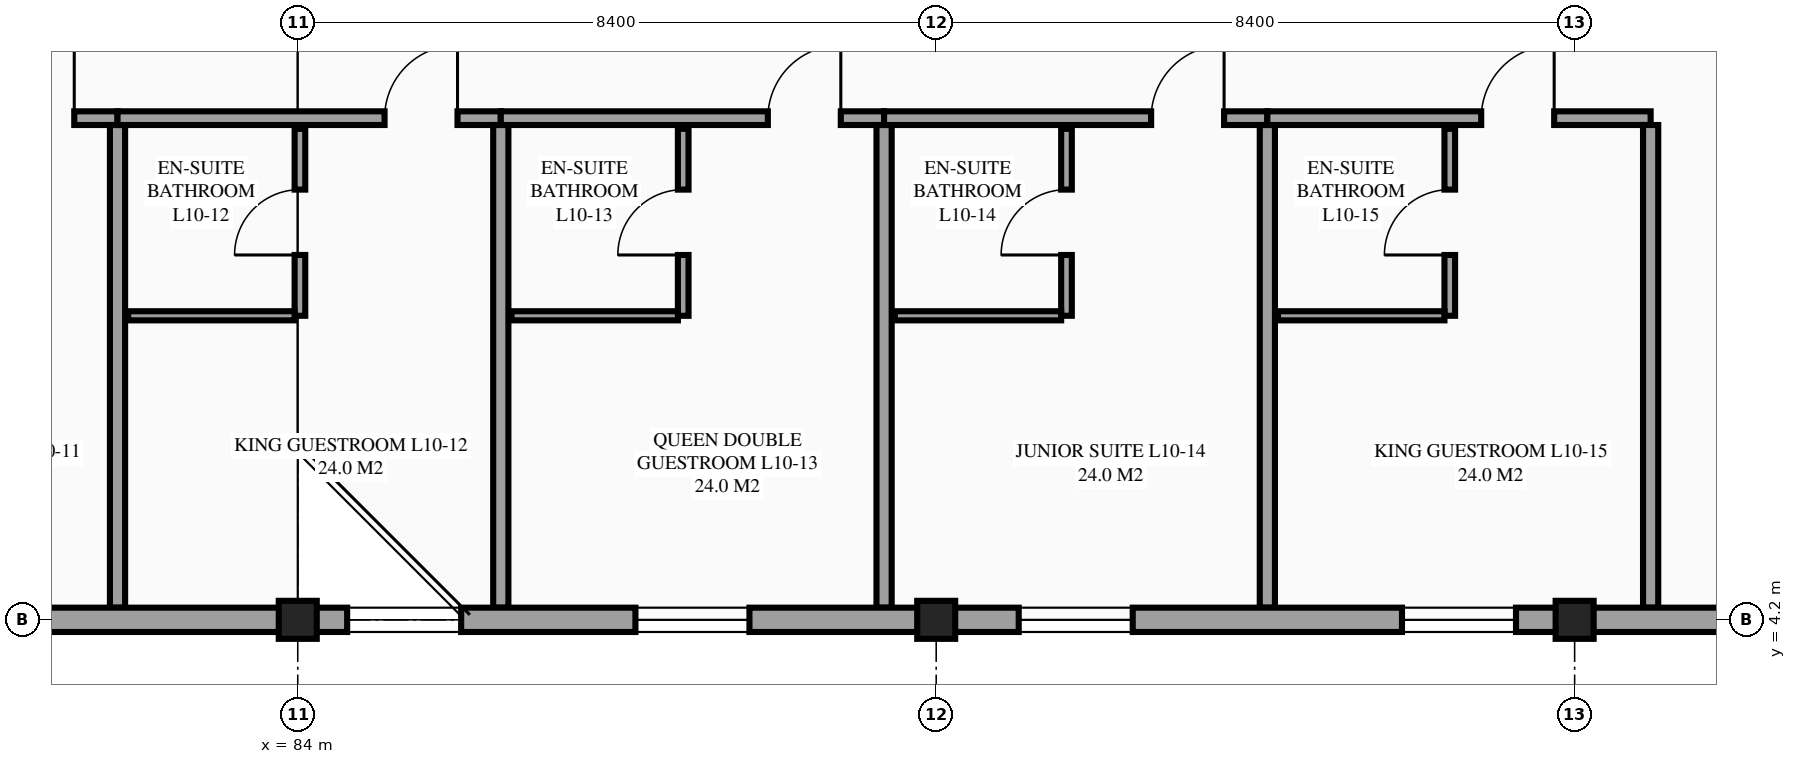
"""IFC4 building model, lengths in metres.
Left out: names, types, materials, properties, quantities, classifications, styles, units other than length and angle.
Written with IfcOpenShell. Run it as: python <this file> out.ifc"""

import sys

from ifc_helpers import new_model, si_unit, direction, frame, frame_2d, origin, origin_2d, place, context, subcontext, project, spatial, rectangle, extrude, element, fill, save


model = new_model("IFC4")
c1 = context("Model", 3, precision=1e-05, world=origin(), true_north=direction((0.0, 1.0)))
c2 = subcontext(c1, "Body", "Model", "MODEL_VIEW")
j1 = project(units=[si_unit("LENGTHUNIT", "METRE"), si_unit("PLANEANGLEUNIT", "RADIAN")], contexts=[c1])
p1 = place(None, origin())
s1 = spatial("IfcSite", under=j1, at=p1, CompositionType="ELEMENT")
p2 = place(p1, origin())
s2 = spatial("IfcBuilding", under=s1, at=p2, CompositionType="ELEMENT")
p3 = place(p2, frame((0.0, 0.0, 39.9)))
s3 = spatial("IfcBuildingStorey", under=s2, at=p3, CompositionType="ELEMENT", Elevation=39.9)
for number, where, z_axis, x_axis in (
    (1, (84.0, 4.2, 0.0), (0.0, 0.0, 1.0), (1.0, 0.0, 0.0)),
    (2, (92.4, 4.2, 0.0), (0.0, 0.0, 1.0), (1.0, 0.0, 0.0)),
    (3, (100.8, 4.2, 0.0), (0.0, 0.0, 1.0), (1.0, 0.0, 0.0)),
):
    element("IfcColumn", number, at=place(p3, frame(where, z_axis=z_axis, x_axis=x_axis)), inside=s3, PredefinedType="COLUMN", context=c2, shape_type="SweptSolid", body=[
        extrude(rectangle(XDim=0.5, YDim=0.5, at=origin_2d()), origin(), (0.0, 0.0, 1.0), 3.6),
    ])
p4 = place(p3, frame((76.586, 10.8, 0.0), z_axis=(0.0, 0.0, 1.0), x_axis=(1.0, 0.0, 0.0)))
e4 = element("IfcWall", 4, at=p4, inside=s3, PredefinedType="PARTITIONING", context=c2, shape_type="SweptSolid", body=[
    extrude(rectangle(XDim=5.043, YDim=0.18, at=frame_2d((2.521, 0.0))), origin(), (0.0, 0.0, 1.0), 3.375),
])
p5 = place(p4, frame((3.514, 0.0, 0.0)))
e5 = element("IfcOpeningElement", 5, at=p5, cuts=e4, PredefinedType="OPENING", context=c2, shape_type="SweptSolid", body=[
    extrude(rectangle(XDim=0.96, YDim=2.15, at=frame_2d((0.48, 1.075))), frame((0.0, 0.1, 0.0), z_axis=(0.0, -1.0, 0.0), x_axis=(1.0, 0.0, 0.0)), (0.0, 0.0, 1.0), 0.2),
])
p6 = place(p3, frame((81.629, 4.36, 0.0), z_axis=(0.0, 0.0, 1.0), x_axis=(0.0, 1.0, 0.0)))
e6 = element("IfcWall", 6, at=p6, inside=s3, PredefinedType="PARTITIONING", context=c2, shape_type="SweptSolid", body=[
    extrude(rectangle(XDim=6.35, YDim=0.2, at=frame_2d((3.175, 0.0))), origin(), (0.0, 0.0, 1.0), 3.375),
])
p7 = place(p3, frame((81.629, 10.8, 0.0), z_axis=(0.0, 0.0, 1.0), x_axis=(1.0, 0.0, 0.0)))
e7 = element("IfcWall", 7, at=p7, inside=s3, PredefinedType="PARTITIONING", context=c2, shape_type="SweptSolid", body=[
    extrude(rectangle(XDim=5.043, YDim=0.18, at=frame_2d((2.521, 0.0))), origin(), (0.0, 0.0, 1.0), 3.375),
])
p8 = place(p7, frame((3.513, 0.0, 0.0)))
e8 = element("IfcOpeningElement", 8, at=p8, cuts=e7, PredefinedType="OPENING", context=c2, shape_type="SweptSolid", body=[
    extrude(rectangle(XDim=0.96, YDim=2.15, at=frame_2d((0.48, 1.075))), frame((0.0, 0.1, 0.0), z_axis=(0.0, -1.0, 0.0), x_axis=(1.0, 0.0, 0.0)), (0.0, 0.0, 1.0), 0.2),
])
p9 = place(p3, frame((86.671, 4.36, 0.0), z_axis=(0.0, 0.0, 1.0), x_axis=(0.0, 1.0, 0.0)))
e9 = element("IfcWall", 9, at=p9, inside=s3, PredefinedType="PARTITIONING", context=c2, shape_type="SweptSolid", body=[
    extrude(rectangle(XDim=6.35, YDim=0.2, at=frame_2d((3.175, 0.0))), origin(), (0.0, 0.0, 1.0), 3.375),
])
p10 = place(p3, frame((84.029, 8.2, 0.0), z_axis=(0.0, 0.0, 1.0), x_axis=(0.0, 1.0, 0.0)))
e10 = element("IfcWall", 10, at=p10, inside=s3, PredefinedType="PARTITIONING", context=c2, shape_type="SweptSolid", body=[
    extrude(rectangle(XDim=2.46, YDim=0.14, at=frame_2d((1.23, 0.0))), origin(), (0.0, 0.0, 1.0), 2.48),
])
p11 = place(p10, frame((0.8, 0.0, 0.0)))
e11 = element("IfcOpeningElement", 11, at=p11, cuts=e10, PredefinedType="OPENING", context=c2, shape_type="SweptSolid", body=[
    extrude(rectangle(XDim=0.86, YDim=2.1, at=frame_2d((0.43, 1.05))), frame((0.0, 0.08, 0.0), z_axis=(0.0, -1.0, 0.0), x_axis=(1.0, 0.0, 0.0)), (0.0, 0.0, 1.0), 0.16),
])
p12 = place(p3, frame((81.769, 8.2, 0.0), z_axis=(0.0, 0.0, 1.0), x_axis=(1.0, 0.0, 0.0)))
e12 = element("IfcWall", 12, at=p12, inside=s3, PredefinedType="PARTITIONING", context=c2, shape_type="SweptSolid", body=[
    extrude(rectangle(XDim=2.19, YDim=0.12, at=frame_2d((1.095, 0.0))), origin(), (0.0, 0.0, 1.0), 3.375),
])
p13 = place(p3, frame((86.671, 10.8, 0.0), z_axis=(0.0, 0.0, 1.0), x_axis=(1.0, 0.0, 0.0)))
e13 = element("IfcWall", 13, at=p13, inside=s3, PredefinedType="PARTITIONING", context=c2, shape_type="SweptSolid", body=[
    extrude(rectangle(XDim=5.043, YDim=0.18, at=frame_2d((2.521, 0.0))), origin(), (0.0, 0.0, 1.0), 3.375),
])
p14 = place(p13, frame((3.514, 0.0, 0.0)))
e14 = element("IfcOpeningElement", 14, at=p14, cuts=e13, PredefinedType="OPENING", context=c2, shape_type="SweptSolid", body=[
    extrude(rectangle(XDim=0.96, YDim=2.15, at=frame_2d((0.48, 1.075))), frame((0.0, 0.1, 0.0), z_axis=(0.0, -1.0, 0.0), x_axis=(1.0, 0.0, 0.0)), (0.0, 0.0, 1.0), 0.2),
])
p15 = place(p3, frame((91.714, 4.36, 0.0), z_axis=(0.0, 0.0, 1.0), x_axis=(0.0, 1.0, 0.0)))
e15 = element("IfcWall", 15, at=p15, inside=s3, PredefinedType="PARTITIONING", context=c2, shape_type="SweptSolid", body=[
    extrude(rectangle(XDim=6.35, YDim=0.2, at=frame_2d((3.175, 0.0))), origin(), (0.0, 0.0, 1.0), 3.375),
])
p16 = place(p3, frame((89.071, 8.2, 0.0), z_axis=(0.0, 0.0, 1.0), x_axis=(0.0, 1.0, 0.0)))
e16 = element("IfcWall", 16, at=p16, inside=s3, PredefinedType="PARTITIONING", context=c2, shape_type="SweptSolid", body=[
    extrude(rectangle(XDim=2.46, YDim=0.14, at=frame_2d((1.23, 0.0))), origin(), (0.0, 0.0, 1.0), 3.375),
])
p17 = place(p16, frame((0.8, 0.0, 0.0)))
e17 = element("IfcOpeningElement", 17, at=p17, cuts=e16, PredefinedType="OPENING", context=c2, shape_type="SweptSolid", body=[
    extrude(rectangle(XDim=0.86, YDim=2.1, at=frame_2d((0.43, 1.05))), frame((0.0, 0.08, 0.0), z_axis=(0.0, -1.0, 0.0), x_axis=(1.0, 0.0, 0.0)), (0.0, 0.0, 1.0), 0.16),
])
p18 = place(p3, frame((86.811, 8.2, 0.0), z_axis=(0.0, 0.0, 1.0), x_axis=(1.0, 0.0, 0.0)))
e18 = element("IfcWall", 18, at=p18, inside=s3, PredefinedType="PARTITIONING", context=c2, shape_type="SweptSolid", body=[
    extrude(rectangle(XDim=2.19, YDim=0.12, at=frame_2d((1.095, 0.0))), origin(), (0.0, 0.0, 1.0), 3.375),
])
p19 = place(p3, frame((91.714, 10.8, 0.0), z_axis=(0.0, 0.0, 1.0), x_axis=(1.0, 0.0, 0.0)))
e19 = element("IfcWall", 19, at=p19, inside=s3, PredefinedType="PARTITIONING", context=c2, shape_type="SweptSolid", body=[
    extrude(rectangle(XDim=5.043, YDim=0.18, at=frame_2d((2.521, 0.0))), origin(), (0.0, 0.0, 1.0), 3.375),
])
p20 = place(p19, frame((3.513, 0.0, 0.0)))
e20 = element("IfcOpeningElement", 20, at=p20, cuts=e19, PredefinedType="OPENING", context=c2, shape_type="SweptSolid", body=[
    extrude(rectangle(XDim=0.96, YDim=2.15, at=frame_2d((0.48, 1.075))), frame((0.0, 0.1, 0.0), z_axis=(0.0, -1.0, 0.0), x_axis=(1.0, 0.0, 0.0)), (0.0, 0.0, 1.0), 0.2),
])
p21 = place(p3, frame((96.757, 4.36, 0.0), z_axis=(0.0, 0.0, 1.0), x_axis=(0.0, 1.0, 0.0)))
e21 = element("IfcWall", 21, at=p21, inside=s3, PredefinedType="PARTITIONING", context=c2, shape_type="SweptSolid", body=[
    extrude(rectangle(XDim=6.35, YDim=0.2, at=frame_2d((3.175, 0.0))), origin(), (0.0, 0.0, 1.0), 3.375),
])
p22 = place(p3, frame((94.114, 8.2, 0.0), z_axis=(0.0, 0.0, 1.0), x_axis=(0.0, 1.0, 0.0)))
e22 = element("IfcWall", 22, at=p22, inside=s3, PredefinedType="PARTITIONING", context=c2, shape_type="SweptSolid", body=[
    extrude(rectangle(XDim=2.46, YDim=0.14, at=frame_2d((1.23, 0.0))), origin(), (0.0, 0.0, 1.0), 3.375),
])
p23 = place(p22, frame((0.8, 0.0, 0.0)))
e23 = element("IfcOpeningElement", 23, at=p23, cuts=e22, PredefinedType="OPENING", context=c2, shape_type="SweptSolid", body=[
    extrude(rectangle(XDim=0.86, YDim=2.1, at=frame_2d((0.43, 1.05))), frame((0.0, 0.08, 0.0), z_axis=(0.0, -1.0, 0.0), x_axis=(1.0, 0.0, 0.0)), (0.0, 0.0, 1.0), 0.16),
])
p24 = place(p3, frame((91.854, 8.2, 0.0), z_axis=(0.0, 0.0, 1.0), x_axis=(1.0, 0.0, 0.0)))
e24 = element("IfcWall", 24, at=p24, inside=s3, PredefinedType="PARTITIONING", context=c2, shape_type="SweptSolid", body=[
    extrude(rectangle(XDim=2.19, YDim=0.12, at=frame_2d((1.095, 0.0))), origin(), (0.0, 0.0, 1.0), 3.375),
])
p25 = place(p3, frame((96.757, 10.8, 0.0), z_axis=(0.0, 0.0, 1.0), x_axis=(1.0, 0.0, 0.0)))
e25 = element("IfcWall", 25, at=p25, inside=s3, PredefinedType="PARTITIONING", context=c2, shape_type="SweptSolid", body=[
    extrude(rectangle(XDim=5.043, YDim=0.18, at=frame_2d((2.521, 0.0))), origin(), (0.0, 0.0, 1.0), 3.375),
])
p26 = place(p25, frame((2.814, 0.0, 0.0)))
e26 = element("IfcOpeningElement", 26, at=p26, cuts=e25, PredefinedType="OPENING", context=c2, shape_type="SweptSolid", body=[
    extrude(rectangle(XDim=0.96, YDim=2.15, at=frame_2d((0.48, 1.075))), frame((0.0, 0.1, 0.0), z_axis=(0.0, -1.0, 0.0), x_axis=(1.0, 0.0, 0.0)), (0.0, 0.0, 1.0), 0.2),
])
p27 = place(p3, frame((101.8, 4.36, 0.0), z_axis=(0.0, 0.0, 1.0), x_axis=(0.0, 1.0, 0.0)))
e27 = element("IfcWall", 27, at=p27, inside=s3, PredefinedType="PARTITIONING", context=c2, shape_type="SweptSolid", body=[
    extrude(rectangle(XDim=6.35, YDim=0.2, at=frame_2d((3.175, 0.0))), origin(), (0.0, 0.0, 1.0), 3.375),
])
p28 = place(p3, frame((99.157, 8.2, 0.0), z_axis=(0.0, 0.0, 1.0), x_axis=(0.0, 1.0, 0.0)))
e28 = element("IfcWall", 28, at=p28, inside=s3, PredefinedType="PARTITIONING", context=c2, shape_type="SweptSolid", body=[
    extrude(rectangle(XDim=2.46, YDim=0.14, at=frame_2d((1.23, 0.0))), origin(), (0.0, 0.0, 1.0), 3.375),
])
p29 = place(p28, frame((0.8, 0.0, 0.0)))
e29 = element("IfcOpeningElement", 29, at=p29, cuts=e28, PredefinedType="OPENING", context=c2, shape_type="SweptSolid", body=[
    extrude(rectangle(XDim=0.86, YDim=2.1, at=frame_2d((0.43, 1.05))), frame((0.0, 0.08, 0.0), z_axis=(0.0, -1.0, 0.0), x_axis=(1.0, 0.0, 0.0)), (0.0, 0.0, 1.0), 0.16),
])
p30 = place(p3, frame((96.897, 8.2, 0.0), z_axis=(0.0, 0.0, 1.0), x_axis=(1.0, 0.0, 0.0)))
e30 = element("IfcWall", 30, at=p30, inside=s3, PredefinedType="PARTITIONING", context=c2, shape_type="SweptSolid", body=[
    extrude(rectangle(XDim=2.19, YDim=0.12, at=frame_2d((1.095, 0.0))), origin(), (0.0, 0.0, 1.0), 3.375),
])
p31 = place(p3, frame((75.6, 4.2, 0.0), z_axis=(0.0, 0.0, 1.0), x_axis=(1.0, 0.0, 0.0)))
e31 = element("IfcWall", 31, at=p31, inside=s3, PredefinedType="STANDARD", context=c2, shape_type="SweptSolid", body=[
    extrude(rectangle(XDim=8.4, YDim=0.32, at=frame_2d((4.2, 0.0))), origin(), (0.0, 0.0, 1.0), 2.48),
])
p32 = place(p31, frame((2.907, 0.0, 0.85)))
e32 = element("IfcOpeningElement", 32, at=p32, cuts=e31, PredefinedType="OPENING", context=c2, shape_type="SweptSolid", body=[
    extrude(rectangle(XDim=1.2, YDim=1.5, at=frame_2d((0.6, 0.75))), frame((0.0, 0.17, 0.0), z_axis=(0.0, -1.0, 0.0), x_axis=(1.0, 0.0, 0.0)), (0.0, 0.0, 1.0), 0.34),
])
p33 = place(p3, frame((84.0, 4.2, 0.0), z_axis=(0.0, 0.0, 1.0), x_axis=(1.0, 0.0, 0.0)))
e33 = element("IfcWall", 33, at=p33, inside=s3, PredefinedType="STANDARD", context=c2, shape_type="SweptSolid", body=[
    extrude(rectangle(XDim=8.4, YDim=0.32, at=frame_2d((4.2, 0.0))), origin(), (0.0, 0.0, 1.0), 2.58),
])
p34 = place(p33, frame((0.65, 0.0, 0.85)))
e34 = element("IfcOpeningElement", 34, at=p34, cuts=e33, PredefinedType="OPENING", context=c2, shape_type="SweptSolid", body=[
    extrude(rectangle(XDim=1.5, YDim=1.5, at=frame_2d((0.75, 0.75))), frame((0.0, 0.17, 0.0), z_axis=(0.0, -1.0, 0.0), x_axis=(1.0, 0.0, 0.0)), (0.0, 0.0, 1.0), 0.34),
])
p35 = place(p33, frame((4.443, 0.0, 0.85)))
e35 = element("IfcOpeningElement", 35, at=p35, cuts=e33, PredefinedType="OPENING", context=c2, shape_type="SweptSolid", body=[
    extrude(rectangle(XDim=1.5, YDim=1.5, at=frame_2d((0.75, 0.75))), frame((0.0, 0.17, 0.0), z_axis=(0.0, -1.0, 0.0), x_axis=(1.0, 0.0, 0.0)), (0.0, 0.0, 1.0), 0.34),
])
p36 = place(p3, frame((92.4, 4.2, 0.0), z_axis=(0.0, 0.0, 1.0), x_axis=(1.0, 0.0, 0.0)))
e36 = element("IfcWall", 36, at=p36, inside=s3, PredefinedType="STANDARD", context=c2, shape_type="SweptSolid", body=[
    extrude(rectangle(XDim=8.4, YDim=0.32, at=frame_2d((4.2, 0.0))), origin(), (0.0, 0.0, 1.0), 3.126),
])
p37 = place(p36, frame((1.086, 0.0, 0.85)))
e37 = element("IfcOpeningElement", 37, at=p37, cuts=e36, PredefinedType="OPENING", context=c2, shape_type="SweptSolid", body=[
    extrude(rectangle(XDim=1.5, YDim=1.5, at=frame_2d((0.75, 0.75))), frame((0.0, 0.17, 0.0), z_axis=(0.0, -1.0, 0.0), x_axis=(1.0, 0.0, 0.0)), (0.0, 0.0, 1.0), 0.34),
])
p38 = place(p36, frame((6.128, 0.0, 0.85)))
e38 = element("IfcOpeningElement", 38, at=p38, cuts=e36, PredefinedType="OPENING", context=c2, shape_type="SweptSolid", body=[
    extrude(rectangle(XDim=1.5, YDim=1.5, at=frame_2d((0.75, 0.75))), frame((0.0, 0.17, 0.0), z_axis=(0.0, -1.0, 0.0), x_axis=(1.0, 0.0, 0.0)), (0.0, 0.0, 1.0), 0.34),
])
p39 = place(p3, frame((100.8, 4.2, 0.0), z_axis=(0.0, 0.0, 1.0), x_axis=(1.0, 0.0, 0.0)))
e39 = element("IfcWall", 39, at=p39, inside=s3, PredefinedType="STANDARD", context=c2, shape_type="SweptSolid", body=[
    extrude(rectangle(XDim=16.8, YDim=0.32, at=frame_2d((8.4, 0.0))), origin(), (0.0, 0.0, 1.0), 2.63),
])
p40 = place(p39, frame((9.45, 0.0, 0.85)))
e40 = element("IfcOpeningElement", 40, at=p40, cuts=e39, PredefinedType="OPENING", context=c2, shape_type="SweptSolid", body=[
    extrude(rectangle(XDim=1.5, YDim=1.5, at=frame_2d((0.75, 0.75))), frame((0.0, 0.17, 0.0), z_axis=(0.0, -1.0, 0.0), x_axis=(1.0, 0.0, 0.0)), (0.0, 0.0, 1.0), 0.34),
])
p41 = place(p39, frame((13.85, 0.0, 0.85)))
e41 = element("IfcOpeningElement", 41, at=p41, cuts=e39, PredefinedType="OPENING", context=c2, shape_type="SweptSolid", body=[
    extrude(rectangle(XDim=1.5, YDim=1.5, at=frame_2d((0.75, 0.75))), frame((0.0, 0.17, 0.0), z_axis=(0.0, -1.0, 0.0), x_axis=(1.0, 0.0, 0.0)), (0.0, 0.0, 1.0), 0.34),
])
p42 = place(p34, origin())
e42 = element("IfcWindow", 42, at=p42, inside=s3, PartitioningType="SINGLE_PANEL", PredefinedType="WINDOW", context=c2, shape_type="SweptSolid", body=[
    extrude(rectangle(XDim=1.5, YDim=1.5, at=frame_2d((0.75, 0.75))), frame((0.0, 0.03, 0.0), z_axis=(0.0, -1.0, 0.0), x_axis=(1.0, 0.0, 0.0)), (0.0, 0.0, 1.0), 0.06),
])
fill(e34, e42)
p43 = place(p35, origin())
e43 = element("IfcWindow", 43, at=p43, inside=s3, PartitioningType="SINGLE_PANEL", PredefinedType="WINDOW", context=c2, shape_type="SweptSolid", body=[
    extrude(rectangle(XDim=1.5, YDim=1.5, at=frame_2d((0.75, 0.75))), frame((0.0, 0.03, 0.0), z_axis=(0.0, -1.0, 0.0), x_axis=(1.0, 0.0, 0.0)), (0.0, 0.0, 1.0), 0.06),
])
fill(e35, e43)
p44 = place(p37, origin())
e44 = element("IfcWindow", 44, at=p44, inside=s3, PartitioningType="SINGLE_PANEL", PredefinedType="WINDOW", context=c2, shape_type="SweptSolid", body=[
    extrude(rectangle(XDim=1.5, YDim=1.5, at=frame_2d((0.75, 0.75))), frame((0.0, 0.03, 0.0), z_axis=(0.0, -1.0, 0.0), x_axis=(1.0, 0.0, 0.0)), (0.0, 0.0, 1.0), 0.06),
])
fill(e37, e44)
p45 = place(p38, origin())
e45 = element("IfcWindow", 45, at=p45, inside=s3, PartitioningType="SINGLE_PANEL", PredefinedType="WINDOW", context=c2, shape_type="SweptSolid", body=[
    extrude(rectangle(XDim=1.5, YDim=1.5, at=frame_2d((0.75, 0.75))), frame((0.0, 0.03, 0.0), z_axis=(0.0, -1.0, 0.0), x_axis=(1.0, 0.0, 0.0)), (0.0, 0.0, 1.0), 0.06),
])
fill(e38, e45)
p46 = place(p5, origin())
e46 = element("IfcDoor", 46, at=p46, inside=s3, OperationType="SINGLE_SWING_RIGHT", PredefinedType="DOOR", context=c2, shape_type="SweptSolid", body=[
    extrude(rectangle(XDim=0.96, YDim=2.15, at=frame_2d((0.48, 1.075))), frame((0.0, 0.025, 0.0), z_axis=(0.0, -1.0, 0.0), x_axis=(1.0, 0.0, 0.0)), (0.0, 0.0, 1.0), 0.05),
])
fill(e5, e46)
p47 = place(p8, origin())
e47 = element("IfcDoor", 47, at=p47, inside=s3, OperationType="SINGLE_SWING_RIGHT", PredefinedType="DOOR", context=c2, shape_type="SweptSolid", body=[
    extrude(rectangle(XDim=0.96, YDim=2.15, at=frame_2d((0.48, 1.075))), frame((0.0, 0.025, 0.0), z_axis=(0.0, -1.0, 0.0), x_axis=(1.0, 0.0, 0.0)), (0.0, 0.0, 1.0), 0.05),
])
fill(e8, e47)
p48 = place(p11, origin())
e48 = element("IfcDoor", 48, at=p48, inside=s3, OperationType="SINGLE_SWING_LEFT", PredefinedType="DOOR", context=c2, shape_type="SweptSolid", body=[
    extrude(rectangle(XDim=0.86, YDim=2.1, at=frame_2d((0.43, 1.05))), frame((0.0, 0.025, 0.0), z_axis=(0.0, -1.0, 0.0), x_axis=(1.0, 0.0, 0.0)), (0.0, 0.0, 1.0), 0.05),
])
fill(e11, e48)
p49 = place(p14, origin())
e49 = element("IfcDoor", 49, at=p49, inside=s3, OperationType="SINGLE_SWING_RIGHT", PredefinedType="DOOR", context=c2, shape_type="SweptSolid", body=[
    extrude(rectangle(XDim=0.96, YDim=2.15, at=frame_2d((0.48, 1.075))), frame((0.0, 0.025, 0.0), z_axis=(0.0, -1.0, 0.0), x_axis=(1.0, 0.0, 0.0)), (0.0, 0.0, 1.0), 0.05),
])
fill(e14, e49)
p50 = place(p17, origin())
e50 = element("IfcDoor", 50, at=p50, inside=s3, OperationType="SINGLE_SWING_LEFT", PredefinedType="DOOR", context=c2, shape_type="SweptSolid", body=[
    extrude(rectangle(XDim=0.86, YDim=2.1, at=frame_2d((0.43, 1.05))), frame((0.0, 0.025, 0.0), z_axis=(0.0, -1.0, 0.0), x_axis=(1.0, 0.0, 0.0)), (0.0, 0.0, 1.0), 0.05),
])
fill(e17, e50)
p51 = place(p20, origin())
e51 = element("IfcDoor", 51, at=p51, inside=s3, OperationType="SINGLE_SWING_RIGHT", PredefinedType="DOOR", context=c2, shape_type="SweptSolid", body=[
    extrude(rectangle(XDim=0.96, YDim=2.15, at=frame_2d((0.48, 1.075))), frame((0.0, 0.025, 0.0), z_axis=(0.0, -1.0, 0.0), x_axis=(1.0, 0.0, 0.0)), (0.0, 0.0, 1.0), 0.05),
])
fill(e20, e51)
p52 = place(p23, origin())
e52 = element("IfcDoor", 52, at=p52, inside=s3, OperationType="SINGLE_SWING_LEFT", PredefinedType="DOOR", context=c2, shape_type="SweptSolid", body=[
    extrude(rectangle(XDim=0.86, YDim=2.1, at=frame_2d((0.43, 1.05))), frame((0.0, 0.025, 0.0), z_axis=(0.0, -1.0, 0.0), x_axis=(1.0, 0.0, 0.0)), (0.0, 0.0, 1.0), 0.05),
])
fill(e23, e52)
p53 = place(p26, origin())
e53 = element("IfcDoor", 53, at=p53, inside=s3, OperationType="SINGLE_SWING_RIGHT", PredefinedType="DOOR", context=c2, shape_type="SweptSolid", body=[
    extrude(rectangle(XDim=0.96, YDim=2.15, at=frame_2d((0.48, 1.075))), frame((0.0, 0.025, 0.0), z_axis=(0.0, -1.0, 0.0), x_axis=(1.0, 0.0, 0.0)), (0.0, 0.0, 1.0), 0.05),
])
fill(e26, e53)
p54 = place(p29, origin())
e54 = element("IfcDoor", 54, at=p54, inside=s3, OperationType="SINGLE_SWING_LEFT", PredefinedType="DOOR", context=c2, shape_type="SweptSolid", body=[
    extrude(rectangle(XDim=0.86, YDim=2.1, at=frame_2d((0.43, 1.05))), frame((0.0, 0.025, 0.0), z_axis=(0.0, -1.0, 0.0), x_axis=(1.0, 0.0, 0.0)), (0.0, 0.0, 1.0), 0.05),
])
fill(e29, e54)
save(model, sys.argv[1])
